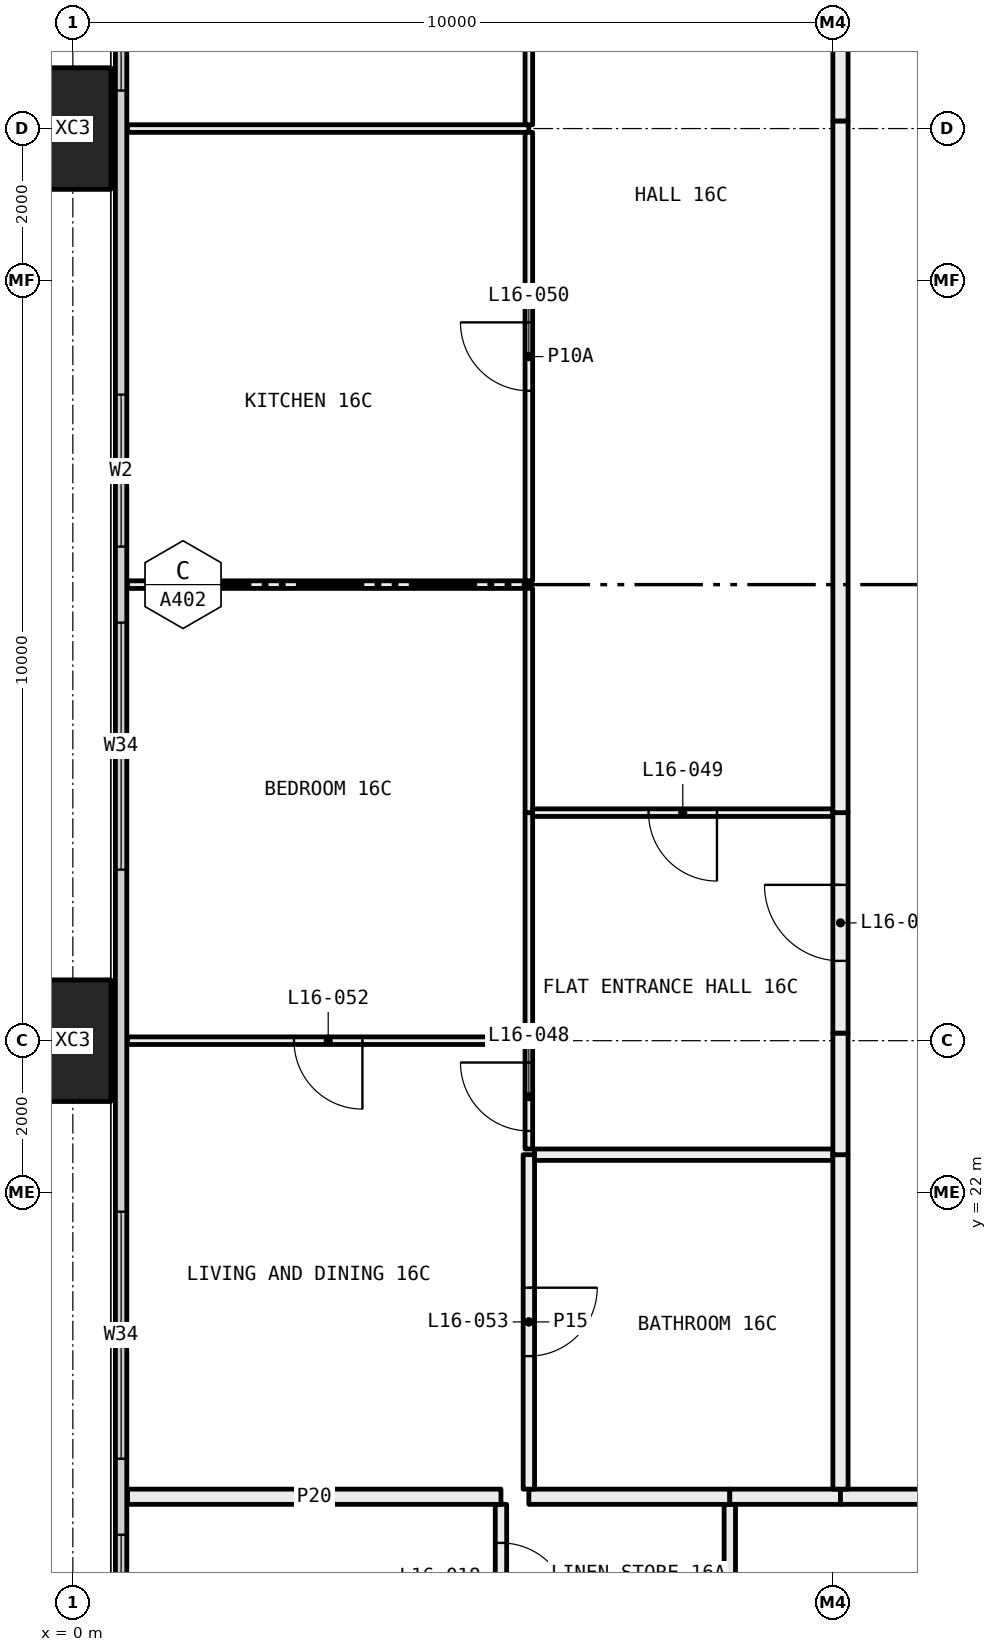
"""IFC4 building model, lengths in metres.
Left out: names, types, materials, properties, quantities, classifications, styles, units other than length and angle.
Written with IfcOpenShell. Run it as: python <this file> out.ifc"""

import sys

from ifc_helpers import new_model, si_unit, direction, frame, frame_2d, origin, origin_2d, place, context, subcontext, project, spatial, rectangle, hollow_rectangle, extrude, element, fill, save


model = new_model("IFC4")
c1 = context("Model", 3, precision=1e-05, world=origin(), true_north=direction((0.0, 1.0)))
c2 = subcontext(c1, "Body", "Model", "MODEL_VIEW")
j1 = project(units=[si_unit("LENGTHUNIT", "METRE"), si_unit("PLANEANGLEUNIT", "RADIAN")], contexts=[c1])
p1 = place(None, origin())
s1 = spatial("IfcSite", under=j1, at=p1, CompositionType="ELEMENT")
p2 = place(p1, origin())
s2 = spatial("IfcBuilding", under=s1, at=p2, CompositionType="ELEMENT")
p3 = place(p2, frame((0.0, 0.0, 67.95)))
s3 = spatial("IfcBuildingStorey", under=s2, at=p3, CompositionType="ELEMENT", Elevation=67.95)
for number, where, z_axis, x_axis in (
    (1, (0.0, 24.0, -0.4), (0.0, 0.0, 1.0), (0.0, 1.0, 0.0)),
    (2, (0.0, 36.0, -0.4), (0.0, 0.0, 1.0), (0.0, 1.0, 0.0)),
):
    element("IfcColumn", number, at=place(p3, frame(where, z_axis=z_axis, x_axis=x_axis)), inside=s3, PredefinedType="COLUMN", context=c2, shape_type="SweptSolid", body=[
        extrude(hollow_rectangle(XDim=1.6, YDim=1.0, WallThickness=0.065, at=origin_2d()), origin(), (0.0, 0.0, 1.0), 3.45),
    ])
p4 = place(p3, frame((0.635, 6.71, 0.0), z_axis=(0.0, 0.0, 1.0), x_axis=(0.0, 1.0, 0.0)))
e3 = element("IfcWall", 3, at=p4, inside=s3, PredefinedType="ELEMENTEDWALL", context=c2, shape_type="SweptSolid", body=[
    extrude(rectangle(XDim=34.58, YDim=0.15, at=frame_2d((17.29, 0.0))), origin(), (0.0, 0.0, 1.0), 3.05),
])
p5 = place(p4, frame((0.29, 0.0, 0.45)))
e4 = element("IfcOpeningElement", 4, at=p5, cuts=e3, PredefinedType="OPENING", context=c2, shape_type="SweptSolid", body=[
    extrude(rectangle(XDim=4.5, YDim=2.55, at=frame_2d((2.25, 1.275))), frame((0.0, 0.085, 0.0), z_axis=(0.0, -1.0, 0.0), x_axis=(1.0, 0.0, 0.0)), (0.0, 0.0, 1.0), 0.17),
])
p6 = place(p4, frame((7.54, 0.0, 0.45)))
e5 = element("IfcOpeningElement", 5, at=p6, cuts=e3, PredefinedType="OPENING", context=c2, shape_type="SweptSolid", body=[
    extrude(rectangle(XDim=3.25, YDim=2.55, at=frame_2d((1.625, 1.275))), frame((0.0, 0.085, 0.0), z_axis=(0.0, -1.0, 0.0), x_axis=(1.0, 0.0, 0.0)), (0.0, 0.0, 1.0), 0.17),
])
p7 = place(p4, frame((11.79, 0.0, 0.45)))
e6 = element("IfcOpeningElement", 6, at=p7, cuts=e3, PredefinedType="OPENING", context=c2, shape_type="SweptSolid", body=[
    extrude(rectangle(XDim=3.25, YDim=2.55, at=frame_2d((1.625, 1.275))), frame((0.0, 0.085, 0.0), z_axis=(0.0, -1.0, 0.0), x_axis=(1.0, 0.0, 0.0)), (0.0, 0.0, 1.0), 0.17),
])
p8 = place(p4, frame((19.54, 0.0, 0.45)))
e7 = element("IfcOpeningElement", 7, at=p8, cuts=e3, PredefinedType="OPENING", context=c2, shape_type="SweptSolid", body=[
    extrude(rectangle(XDim=3.25, YDim=2.55, at=frame_2d((1.625, 1.275))), frame((0.0, 0.085, 0.0), z_axis=(0.0, -1.0, 0.0), x_axis=(1.0, 0.0, 0.0)), (0.0, 0.0, 1.0), 0.17),
])
p9 = place(p4, frame((23.79, 0.0, 0.45)))
e8 = element("IfcOpeningElement", 8, at=p9, cuts=e3, PredefinedType="OPENING", context=c2, shape_type="SweptSolid", body=[
    extrude(rectangle(XDim=2.0, YDim=2.55, at=frame_2d((1.0, 1.275))), frame((0.0, 0.085, 0.0), z_axis=(0.0, -1.0, 0.0), x_axis=(1.0, 0.0, 0.0)), (0.0, 0.0, 1.0), 0.17),
])
p10 = place(p4, frame((29.79, 0.0, 0.45)))
e9 = element("IfcOpeningElement", 9, at=p10, cuts=e3, PredefinedType="OPENING", context=c2, shape_type="SweptSolid", body=[
    extrude(rectangle(XDim=4.5, YDim=2.55, at=frame_2d((2.25, 1.275))), frame((0.0, 0.085, 0.0), z_axis=(0.0, -1.0, 0.0), x_axis=(1.0, 0.0, 0.0)), (0.0, 0.0, 1.0), 0.17),
])
p11 = place(p3, frame((5.633, 15.985, 0.0), z_axis=(0.0, 0.0, 1.0), x_axis=(0.0, 1.0, 0.0)))
e10 = element("IfcWall", 10, at=p11, inside=s3, PredefinedType="PARTITIONING", context=c2, shape_type="SweptSolid", body=[
    extrude(rectangle(XDim=1.915, YDim=0.15, at=frame_2d((0.958, 0.0))), origin(), (0.0, 0.0, 1.0), 3.05),
])
p12 = place(p11, frame((0.508, 0.0, 0.0)))
e11 = element("IfcOpeningElement", 11, at=p12, cuts=e10, PredefinedType="OPENING", context=c2, shape_type="SweptSolid", body=[
    extrude(rectangle(XDim=0.9, YDim=2.1, at=frame_2d((0.45, 1.05))), frame((0.0, 0.085, 0.0), z_axis=(0.0, -1.0, 0.0), x_axis=(1.0, 0.0, 0.0)), (0.0, 0.0, 1.0), 0.17),
])
p13 = place(p3, frame((5.633, 18.0, 0.0), z_axis=(0.0, 0.0, 1.0), x_axis=(-1.0, 0.0, 0.0)))
e12 = element("IfcWall", 12, at=p13, inside=s3, PredefinedType="PARTITIONING", context=c2, shape_type="SweptSolid", body=[
    extrude(rectangle(XDim=4.913, YDim=0.2, at=frame_2d((2.457, 0.0))), origin(), (0.0, 0.0, 1.0), 3.05),
])
p14 = place(p3, frame((8.644, 16.06, 0.0), z_axis=(0.0, 0.0, 1.0), x_axis=(0.0, 1.0, 0.0)))
e13 = element("IfcWall", 13, at=p14, inside=s3, PredefinedType="PARTITIONING", context=c2, shape_type="SweptSolid", body=[
    extrude(rectangle(XDim=1.84, YDim=0.15, at=frame_2d((0.92, 0.0))), origin(), (0.0, 0.0, 1.0), 3.05),
])
p15 = place(p3, frame((8.644, 18.0, 0.0), z_axis=(0.0, 0.0, 1.0), x_axis=(-1.0, 0.0, 0.0)))
e14 = element("IfcWall", 14, at=p15, inside=s3, PredefinedType="PARTITIONING", context=c2, shape_type="SweptSolid", body=[
    extrude(rectangle(XDim=2.644, YDim=0.2, at=frame_2d((1.322, 0.0))), origin(), (0.0, 0.0, 1.0), 3.05),
])
p16 = place(p3, frame((10.1, 18.0, 0.0), z_axis=(0.0, 0.0, 1.0), x_axis=(-1.0, 0.0, 0.0)))
e15 = element("IfcWall", 15, at=p16, inside=s3, PredefinedType="PARTITIONING", context=c2, shape_type="SweptSolid", body=[
    extrude(rectangle(XDim=1.456, YDim=0.2, at=frame_2d((0.728, 0.0))), origin(), (0.0, 0.0, 1.0), 3.05),
])
p17 = place(p3, frame((13.5, 18.0, 0.0), z_axis=(0.0, 0.0, 1.0), x_axis=(-1.0, 0.0, 0.0)))
e16 = element("IfcWall", 16, at=p17, inside=s3, PredefinedType="PARTITIONING", context=c2, shape_type="SweptSolid", body=[
    extrude(rectangle(XDim=3.4, YDim=0.2, at=frame_2d((1.7, 0.0))), origin(), (0.0, 0.0, 1.0), 3.05),
])
p18 = place(p3, frame((6.0, 24.0, 0.0), z_axis=(0.0, 0.0, 1.0), x_axis=(-1.0, 0.0, 0.0)))
e17 = element("IfcWall", 17, at=p18, inside=s3, PredefinedType="PARTITIONING", context=c2, shape_type="SweptSolid", body=[
    extrude(rectangle(XDim=5.28, YDim=0.1, at=frame_2d((2.64, 0.0))), origin(), (0.0, 0.0, 1.0), 2.45),
])
p19 = place(p18, frame((2.19, 0.0, 0.0)))
e18 = element("IfcOpeningElement", 18, at=p19, cuts=e17, PredefinedType="OPENING", context=c2, shape_type="SweptSolid", body=[
    extrude(rectangle(XDim=0.9, YDim=2.1, at=frame_2d((0.45, 1.05))), frame((0.0, 0.06, 0.0), z_axis=(0.0, -1.0, 0.0), x_axis=(1.0, 0.0, 0.0)), (0.0, 0.0, 1.0), 0.12),
])
p20 = place(p3, frame((6.0, 18.1, 0.0), z_axis=(0.0, 0.0, 1.0), x_axis=(0.0, 1.0, 0.0)))
e19 = element("IfcWall", 19, at=p20, inside=s3, PredefinedType="PARTITIONING", context=c2, shape_type="SweptSolid", body=[
    extrude(rectangle(XDim=4.4, YDim=0.15, at=frame_2d((2.2, 0.0))), origin(), (0.0, 0.0, 1.0), 3.05),
])
p21 = place(p20, frame((1.75, 0.0, 0.0)))
e20 = element("IfcOpeningElement", 20, at=p21, cuts=e19, PredefinedType="OPENING", context=c2, shape_type="SweptSolid", body=[
    extrude(rectangle(XDim=0.9, YDim=2.1, at=frame_2d((0.45, 1.05))), frame((0.0, 0.085, 0.0), z_axis=(0.0, -1.0, 0.0), x_axis=(1.0, 0.0, 0.0)), (0.0, 0.0, 1.0), 0.17),
])
p22 = place(p3, frame((6.0, 22.575, 0.0), z_axis=(0.0, 0.0, 1.0), x_axis=(0.0, 1.0, 0.0)))
e21 = element("IfcWall", 21, at=p22, inside=s3, PredefinedType="PARTITIONING", context=c2, shape_type="SweptSolid", body=[
    extrude(rectangle(XDim=1.375, YDim=0.1, at=frame_2d((0.688, 0.0))), origin(), (0.0, 0.0, 1.0), 2.45),
])
p23 = place(p22, frame((0.238, 0.0, 0.0)))
e22 = element("IfcOpeningElement", 22, at=p23, cuts=e21, PredefinedType="OPENING", context=c2, shape_type="SweptSolid", body=[
    extrude(rectangle(XDim=0.9, YDim=2.1, at=frame_2d((0.45, 1.05))), frame((0.0, 0.06, 0.0), z_axis=(0.0, -1.0, 0.0), x_axis=(1.0, 0.0, 0.0)), (0.0, 0.0, 1.0), 0.12),
])
p24 = place(p3, frame((6.0, 30.0, 0.0), z_axis=(0.0, 0.0, 1.0), x_axis=(-1.0, 0.0, 0.0)))
e23 = element("IfcWall", 23, at=p24, inside=s3, PredefinedType="PARTITIONING", context=c2, shape_type="SweptSolid", body=[
    extrude(rectangle(XDim=5.28, YDim=0.1, at=frame_2d((2.64, 0.0))), origin(), (0.0, 0.0, 1.0), 3.05),
])
p25 = place(p3, frame((6.0, 24.05, 0.0), z_axis=(0.0, 0.0, 1.0), x_axis=(0.0, 1.0, 0.0)))
e24 = element("IfcWall", 24, at=p25, inside=s3, PredefinedType="PARTITIONING", context=c2, shape_type="SweptSolid", body=[
    extrude(rectangle(XDim=2.95, YDim=0.1, at=frame_2d((1.475, 0.0))), origin(), (0.0, 0.0, 1.0), 2.45),
])
p26 = place(p3, frame((6.0, 27.0, 0.0), z_axis=(0.0, 0.0, 1.0), x_axis=(0.0, 1.0, 0.0)))
e25 = element("IfcWall", 25, at=p26, inside=s3, PredefinedType="PARTITIONING", context=c2, shape_type="SweptSolid", body=[
    extrude(rectangle(XDim=2.95, YDim=0.1, at=frame_2d((1.475, 0.0))), origin(), (0.0, 0.0, 1.0), 3.05),
])
p27 = place(p3, frame((6.0, 36.0, 0.0), z_axis=(0.0, 0.0, 1.0), x_axis=(-1.0, 0.0, 0.0)))
e26 = element("IfcWall", 26, at=p27, inside=s3, PredefinedType="PARTITIONING", context=c2, shape_type="SweptSolid", body=[
    extrude(rectangle(XDim=5.28, YDim=0.1, at=frame_2d((2.64, 0.0))), origin(), (0.0, 0.0, 1.0), 2.45),
])
p28 = place(p3, frame((6.0, 30.05, 0.0), z_axis=(0.0, 0.0, 1.0), x_axis=(0.0, 1.0, 0.0)))
e27 = element("IfcWall", 27, at=p28, inside=s3, PredefinedType="PARTITIONING", context=c2, shape_type="SweptSolid", body=[
    extrude(rectangle(XDim=5.9, YDim=0.1, at=frame_2d((2.95, 0.0))), origin(), (0.0, 0.0, 1.0), 2.45),
])
p29 = place(p28, frame((2.5, 0.0, 0.0)))
e28 = element("IfcOpeningElement", 28, at=p29, cuts=e27, PredefinedType="OPENING", context=c2, shape_type="SweptSolid", body=[
    extrude(rectangle(XDim=0.9, YDim=2.1, at=frame_2d((0.45, 1.05))), frame((0.0, 0.06, 0.0), z_axis=(0.0, -1.0, 0.0), x_axis=(1.0, 0.0, 0.0)), (0.0, 0.0, 1.0), 0.12),
])
p30 = place(p3, frame((6.0, 36.05, 0.0), z_axis=(0.0, 0.0, 1.0), x_axis=(0.0, 1.0, 0.0)))
e29 = element("IfcWall", 29, at=p30, inside=s3, PredefinedType="PARTITIONING", context=c2, shape_type="SweptSolid", body=[
    extrude(rectangle(XDim=2.875, YDim=0.1, at=frame_2d((1.438, 0.0))), origin(), (0.0, 0.0, 1.0), 2.45),
])
p31 = place(p30, frame((0.988, 0.0, 0.0)))
e30 = element("IfcOpeningElement", 30, at=p31, cuts=e29, PredefinedType="OPENING", context=c2, shape_type="SweptSolid", body=[
    extrude(rectangle(XDim=0.9, YDim=2.1, at=frame_2d((0.45, 1.05))), frame((0.0, 0.06, 0.0), z_axis=(0.0, -1.0, 0.0), x_axis=(1.0, 0.0, 0.0)), (0.0, 0.0, 1.0), 0.12),
])
p32 = place(p3, frame((10.0, 22.5, 0.0), z_axis=(0.0, 0.0, 1.0), x_axis=(-1.0, 0.0, 0.0)))
e31 = element("IfcWall", 31, at=p32, inside=s3, PredefinedType="PARTITIONING", context=c2, shape_type="SweptSolid", body=[
    extrude(rectangle(XDim=3.925, YDim=0.15, at=frame_2d((1.962, 0.0))), origin(), (0.0, 0.0, 1.0), 3.05),
])
p33 = place(p3, frame((10.1, 18.1, 0.0), z_axis=(0.0, 0.0, 1.0), x_axis=(0.0, 1.0, 0.0)))
e32 = element("IfcWall", 32, at=p33, inside=s3, PredefinedType="PARTITIONING", context=c2, shape_type="SweptSolid", body=[
    extrude(rectangle(XDim=4.4, YDim=0.2, at=frame_2d((2.2, 0.0))), origin(), (0.0, 0.0, 1.0), 3.05),
])
p34 = place(p3, frame((10.0, 27.0, 0.0), z_axis=(0.0, 0.0, 1.0), x_axis=(-1.0, 0.0, 0.0)))
e33 = element("IfcWall", 33, at=p34, inside=s3, PredefinedType="PARTITIONING", context=c2, shape_type="SweptSolid", body=[
    extrude(rectangle(XDim=3.95, YDim=0.1, at=frame_2d((1.975, 0.0))), origin(), (0.0, 0.0, 1.0), 3.05),
])
p35 = place(p34, frame((1.525, 0.0, 0.0)))
e34 = element("IfcOpeningElement", 34, at=p35, cuts=e33, PredefinedType="OPENING", context=c2, shape_type="SweptSolid", body=[
    extrude(rectangle(XDim=0.9, YDim=2.1, at=frame_2d((0.45, 1.05))), frame((0.0, 0.06, 0.0), z_axis=(0.0, -1.0, 0.0), x_axis=(1.0, 0.0, 0.0)), (0.0, 0.0, 1.0), 0.12),
])
p36 = place(p3, frame((10.1, 22.5, 0.0), z_axis=(0.0, 0.0, 1.0), x_axis=(0.0, 1.0, 0.0)))
e35 = element("IfcWall", 35, at=p36, inside=s3, PredefinedType="PARTITIONING", context=c2, shape_type="SweptSolid", body=[
    extrude(rectangle(XDim=1.6, YDim=0.2, at=frame_2d((0.8, 0.0))), origin(), (0.0, 0.0, 1.0), 2.45),
])
p37 = place(p3, frame((10.1, 24.1, 0.0), z_axis=(0.0, 0.0, 1.0), x_axis=(0.0, 1.0, 0.0)))
e36 = element("IfcWall", 36, at=p37, inside=s3, PredefinedType="PARTITIONING", context=c2, shape_type="SweptSolid", body=[
    extrude(rectangle(XDim=2.9, YDim=0.2, at=frame_2d((1.45, 0.0))), origin(), (0.0, 0.0, 1.0), 3.05),
])
p38 = place(p37, frame((0.95, 0.0, 0.0)))
e37 = element("IfcOpeningElement", 37, at=p38, cuts=e36, PredefinedType="OPENING", context=c2, shape_type="SweptSolid", body=[
    extrude(rectangle(XDim=1.0, YDim=2.1, at=frame_2d((0.5, 1.05))), frame((0.0, 0.11, 0.0), z_axis=(0.0, -1.0, 0.0), x_axis=(1.0, 0.0, 0.0)), (0.0, 0.0, 1.0), 0.22),
])
p39 = place(p3, frame((10.1, 27.0, 0.0), z_axis=(0.0, 0.0, 1.0), x_axis=(0.0, 1.0, 0.0)))
e38 = element("IfcWall", 38, at=p39, inside=s3, PredefinedType="PARTITIONING", context=c2, shape_type="SweptSolid", body=[
    extrude(rectangle(XDim=9.1, YDim=0.2, at=frame_2d((4.55, 0.0))), origin(), (0.0, 0.0, 1.0), 2.45),
])
p40 = place(p3, frame((10.1, 36.1, 0.0), z_axis=(0.0, 0.0, 1.0), x_axis=(0.0, 1.0, 0.0)))
e39 = element("IfcWall", 39, at=p40, inside=s3, PredefinedType="PARTITIONING", context=c2, shape_type="SweptSolid", body=[
    extrude(rectangle(XDim=2.9, YDim=0.2, at=frame_2d((1.45, 0.0))), origin(), (0.0, 0.0, 1.0), 3.05),
])
p41 = place(p6, origin())
e40 = element("IfcWindow", 40, at=p41, inside=s3, PartitioningType="SINGLE_PANEL", PredefinedType="WINDOW", context=c2, shape_type="SweptSolid", body=[
    extrude(rectangle(XDim=3.25, YDim=2.55, at=frame_2d((1.625, 1.275))), frame((0.0, 0.03, 0.0), z_axis=(0.0, -1.0, 0.0), x_axis=(1.0, 0.0, 0.0)), (0.0, 0.0, 1.0), 0.06),
])
fill(e5, e40)
p42 = place(p7, origin())
e41 = element("IfcWindow", 41, at=p42, inside=s3, PartitioningType="SINGLE_PANEL", PredefinedType="WINDOW", context=c2, shape_type="SweptSolid", body=[
    extrude(rectangle(XDim=3.25, YDim=2.55, at=frame_2d((1.625, 1.275))), frame((0.0, 0.03, 0.0), z_axis=(0.0, -1.0, 0.0), x_axis=(1.0, 0.0, 0.0)), (0.0, 0.0, 1.0), 0.06),
])
fill(e6, e41)
p43 = place(p8, origin())
e42 = element("IfcWindow", 42, at=p43, inside=s3, PartitioningType="SINGLE_PANEL", PredefinedType="WINDOW", context=c2, shape_type="SweptSolid", body=[
    extrude(rectangle(XDim=3.25, YDim=2.55, at=frame_2d((1.625, 1.275))), frame((0.0, 0.03, 0.0), z_axis=(0.0, -1.0, 0.0), x_axis=(1.0, 0.0, 0.0)), (0.0, 0.0, 1.0), 0.06),
])
fill(e7, e42)
p44 = place(p9, origin())
e43 = element("IfcWindow", 43, at=p44, inside=s3, PartitioningType="SINGLE_PANEL", PredefinedType="WINDOW", context=c2, shape_type="SweptSolid", body=[
    extrude(rectangle(XDim=2.0, YDim=2.55, at=frame_2d((1.0, 1.275))), frame((0.0, 0.03, 0.0), z_axis=(0.0, -1.0, 0.0), x_axis=(1.0, 0.0, 0.0)), (0.0, 0.0, 1.0), 0.06),
])
fill(e8, e43)
p45 = place(p10, origin())
e44 = element("IfcWindow", 44, at=p45, inside=s3, PartitioningType="SINGLE_PANEL", PredefinedType="WINDOW", context=c2, shape_type="SweptSolid", body=[
    extrude(rectangle(XDim=4.5, YDim=2.55, at=frame_2d((2.25, 1.275))), frame((0.0, 0.03, 0.0), z_axis=(0.0, -1.0, 0.0), x_axis=(1.0, 0.0, 0.0)), (0.0, 0.0, 1.0), 0.06),
])
fill(e9, e44)
p46 = place(p12, frame((0.9, 0.0, 0.0), x_axis=(-1.0, 0.0, 0.0)))
e45 = element("IfcDoor", 45, at=p46, inside=s3, OperationType="SINGLE_SWING_LEFT", PredefinedType="DOOR", context=c2, shape_type="SweptSolid", body=[
    extrude(rectangle(XDim=0.9, YDim=2.1, at=frame_2d((0.45, 1.05))), frame((0.0, 0.025, 0.0), z_axis=(0.0, -1.0, 0.0), x_axis=(1.0, 0.0, 0.0)), (0.0, 0.0, 1.0), 0.05),
])
fill(e11, e45)
p47 = place(p38, origin())
e46 = element("IfcDoor", 46, at=p47, inside=s3, OperationType="SINGLE_SWING_LEFT", PredefinedType="DOOR", context=c2, shape_type="SweptSolid", body=[
    extrude(rectangle(XDim=1.0, YDim=2.1, at=frame_2d((0.5, 1.05))), frame((0.0, 0.025, 0.0), z_axis=(0.0, -1.0, 0.0), x_axis=(1.0, 0.0, 0.0)), (0.0, 0.0, 1.0), 0.05),
])
fill(e37, e46)
p48 = place(p23, origin())
e47 = element("IfcDoor", 47, at=p48, inside=s3, OperationType="SINGLE_SWING_LEFT", PredefinedType="DOOR", context=c2, shape_type="SweptSolid", body=[
    extrude(rectangle(XDim=0.9, YDim=2.1, at=frame_2d((0.45, 1.05))), frame((0.0, 0.025, 0.0), z_axis=(0.0, -1.0, 0.0), x_axis=(1.0, 0.0, 0.0)), (0.0, 0.0, 1.0), 0.05),
])
fill(e22, e47)
p49 = place(p35, origin())
e48 = element("IfcDoor", 48, at=p49, inside=s3, OperationType="SINGLE_SWING_RIGHT", PredefinedType="DOOR", context=c2, shape_type="SweptSolid", body=[
    extrude(rectangle(XDim=0.9, YDim=2.1, at=frame_2d((0.45, 1.05))), frame((0.0, 0.025, 0.0), z_axis=(0.0, -1.0, 0.0), x_axis=(1.0, 0.0, 0.0)), (0.0, 0.0, 1.0), 0.05),
])
fill(e34, e48)
p50 = place(p29, origin())
e49 = element("IfcDoor", 49, at=p50, inside=s3, OperationType="SINGLE_SWING_LEFT", PredefinedType="DOOR", context=c2, shape_type="SweptSolid", body=[
    extrude(rectangle(XDim=0.9, YDim=2.1, at=frame_2d((0.45, 1.05))), frame((0.0, 0.025, 0.0), z_axis=(0.0, -1.0, 0.0), x_axis=(1.0, 0.0, 0.0)), (0.0, 0.0, 1.0), 0.05),
])
fill(e28, e49)
p51 = place(p19, origin())
e50 = element("IfcDoor", 50, at=p51, inside=s3, OperationType="SINGLE_SWING_RIGHT", PredefinedType="DOOR", context=c2, shape_type="SweptSolid", body=[
    extrude(rectangle(XDim=0.9, YDim=2.1, at=frame_2d((0.45, 1.05))), frame((0.0, 0.025, 0.0), z_axis=(0.0, -1.0, 0.0), x_axis=(1.0, 0.0, 0.0)), (0.0, 0.0, 1.0), 0.05),
])
fill(e18, e50)
p52 = place(p21, frame((0.9, 0.0, 0.0), x_axis=(-1.0, 0.0, 0.0)))
e51 = element("IfcDoor", 51, at=p52, inside=s3, OperationType="SINGLE_SWING_RIGHT", PredefinedType="DOOR", context=c2, shape_type="SweptSolid", body=[
    extrude(rectangle(XDim=0.9, YDim=2.1, at=frame_2d((0.45, 1.05))), frame((0.0, 0.025, 0.0), z_axis=(0.0, -1.0, 0.0), x_axis=(1.0, 0.0, 0.0)), (0.0, 0.0, 1.0), 0.05),
])
fill(e20, e51)
save(model, sys.argv[1])
